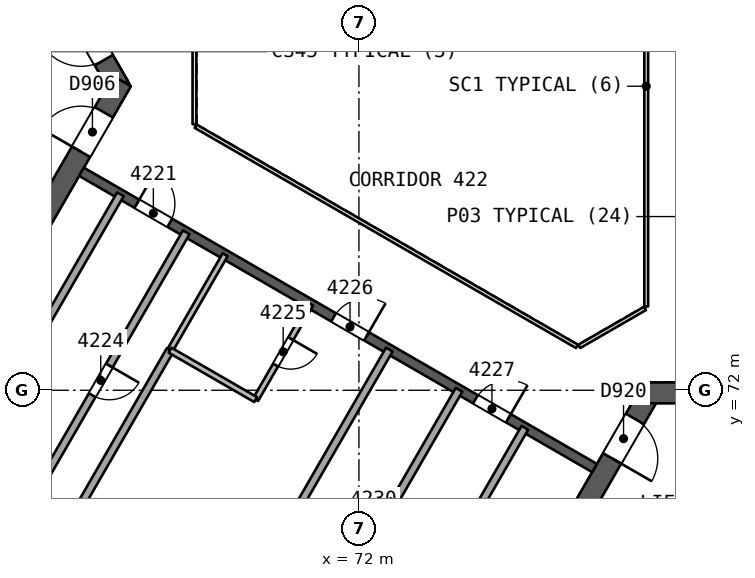
"""IFC4 building model, lengths in metres.
Left out: names, types, materials, properties, quantities, classifications, styles, units other than length and angle.
Written with IfcOpenShell. Run it as: python <this file> out.ifc"""

import sys

from ifc_helpers import new_model, si_unit, direction, frame, frame_2d, origin, place, context, subcontext, project, spatial, rectangle, extrude, element, fill, save


model = new_model("IFC4")
c1 = context("Model", 3, precision=1e-05, world=origin(), true_north=direction((0.0, 1.0)))
c2 = subcontext(c1, "Body", "Model", "MODEL_VIEW")
j1 = project(units=[si_unit("LENGTHUNIT", "METRE"), si_unit("PLANEANGLEUNIT", "RADIAN")], contexts=[c1])
p1 = place(None, origin())
s1 = spatial("IfcSite", under=j1, at=p1, CompositionType="ELEMENT")
p2 = place(p1, origin())
s2 = spatial("IfcBuilding", under=s1, at=p2, CompositionType="ELEMENT")
p3 = place(p2, frame((0.0, 0.0, 174.8)))
s3 = spatial("IfcBuildingStorey", under=s2, at=p3, CompositionType="ELEMENT", Elevation=174.8)
p4 = place(p3, frame((65.682, 80.0, 0.0), z_axis=(0.0, 0.0, 1.0), x_axis=(-0.500000202252, 0.866025287014, 0.0)))
e1 = element("IfcWall", 1, at=p4, inside=s3, PredefinedType="SHEAR", context=c2, shape_type="SweptSolid", body=[
    extrude(rectangle(XDim=10.221, YDim=0.55, at=frame_2d((5.111, 0.0))), origin(), (0.0, 0.0, 1.0), 3.7),
])
p5 = place(p4, frame((0.791, 0.0, 0.0)))
e2 = element("IfcOpeningElement", 2, at=p5, cuts=e1, PredefinedType="OPENING", context=c2, shape_type="SweptSolid", body=[
    extrude(rectangle(XDim=1.2, YDim=2.1, at=frame_2d((0.6, 1.05))), frame((0.0, 0.286, 0.0), z_axis=(0.0, -1.0, 0.0), x_axis=(1.0, 0.0, 0.0)), (0.0, 0.0, 1.0), 0.571),
])
p6 = place(p3, frame((60.709, 71.386, 0.0), z_axis=(0.0, 0.0, 1.0), x_axis=(0.500015938302, 0.866016201606, 0.0)))
e3 = element("IfcWall", 3, at=p6, inside=s3, PredefinedType="SHEAR", context=c2, shape_type="SweptSolid", body=[
    extrude(rectangle(XDim=10.105, YDim=0.55, at=frame_2d((5.053, 0.0))), origin(), (0.0, 0.0, 1.0), 3.7),
])
p7 = place(p6, frame((7.955, 0.0, 0.0)))
e4 = element("IfcOpeningElement", 4, at=p7, cuts=e3, PredefinedType="OPENING", context=c2, shape_type="SweptSolid", body=[
    extrude(rectangle(XDim=1.2, YDim=2.1, at=frame_2d((0.6, 1.05))), frame((0.0, 0.286, 0.0), z_axis=(0.0, -1.0, 0.0), x_axis=(1.0, 0.0, 0.0)), (0.0, 0.0, 1.0), 0.571),
])
p8 = place(p3, frame((79.659, 71.931, 0.0), z_axis=(0.0, 0.0, 1.0), x_axis=(-0.500000202252, -0.866025287014, 0.0)))
e5 = element("IfcWall", 5, at=p8, inside=s3, PredefinedType="SHEAR", context=c2, shape_type="SweptSolid", body=[
    extrude(rectangle(XDim=10.221, YDim=0.55, at=frame_2d((5.111, 0.0))), origin(), (0.0, 0.0, 1.0), 3.7),
])
p9 = place(p8, frame((0.791, 0.0, 0.0)))
e6 = element("IfcOpeningElement", 6, at=p9, cuts=e5, PredefinedType="OPENING", context=c2, shape_type="SweptSolid", body=[
    extrude(rectangle(XDim=1.2, YDim=2.1, at=frame_2d((0.6, 1.05))), frame((0.0, 0.286, 0.0), z_axis=(0.0, -1.0, 0.0), x_axis=(1.0, 0.0, 0.0)), (0.0, 0.0, 1.0), 0.571),
])
p10 = place(p3, frame((89.605, 71.931, 0.0), z_axis=(0.0, 0.0, 1.0), x_axis=(-1.0, 0.0, 0.0)))
e7 = element("IfcWall", 7, at=p10, inside=s3, PredefinedType="SHEAR", context=c2, shape_type="SweptSolid", body=[
    extrude(rectangle(XDim=10.105, YDim=0.55, at=frame_2d((5.052, 0.0))), origin(), (0.0, 0.0, 1.0), 3.7),
])
p11 = place(p10, frame((7.955, 0.0, 0.0)))
e8 = element("IfcOpeningElement", 8, at=p11, cuts=e7, PredefinedType="OPENING", context=c2, shape_type="SweptSolid", body=[
    extrude(rectangle(XDim=1.2, YDim=2.1, at=frame_2d((0.6, 1.05))), frame((0.0, 0.286, 0.0), z_axis=(0.0, -1.0, 0.0), x_axis=(1.0, 0.0, 0.0)), (0.0, 0.0, 1.0), 0.571),
])
p12 = place(p3, frame((64.7, 77.748, 0.0), z_axis=(0.0, 0.0, 1.0), x_axis=(0.866026492143, -0.499998114903, 0.0)))
e9 = element("IfcWall", 9, at=p12, inside=s3, PredefinedType="SHEAR", context=c2, shape_type="SweptSolid", body=[
    extrude(rectangle(XDim=15.588, YDim=0.25, at=frame_2d((7.794, 0.0))), origin(), (0.0, 0.0, 1.0), 3.25),
])
p13 = place(p12, frame((1.682, 0.0, 0.0)))
e10 = element("IfcOpeningElement", 10, at=p13, cuts=e9, PredefinedType="OPENING", context=c2, shape_type="SweptSolid", body=[
    extrude(rectangle(XDim=1.0, YDim=2.1, at=frame_2d((0.5, 1.05))), frame((0.0, 0.135, 0.0), z_axis=(0.0, -1.0, 0.0), x_axis=(1.0, 0.0, 0.0)), (0.0, 0.0, 1.0), 0.271),
])
p14 = place(p12, frame((7.659, 0.0, 0.0)))
e11 = element("IfcOpeningElement", 11, at=p14, cuts=e9, PredefinedType="OPENING", context=c2, shape_type="SweptSolid", body=[
    extrude(rectangle(XDim=1.0, YDim=2.1, at=frame_2d((0.5, 1.05))), frame((0.0, 0.135, 0.0), z_axis=(0.0, -1.0, 0.0), x_axis=(1.0, 0.0, 0.0)), (0.0, 0.0, 1.0), 0.271),
])
p15 = place(p12, frame((11.971, 0.0, 0.0)))
e12 = element("IfcOpeningElement", 12, at=p15, cuts=e9, PredefinedType="OPENING", context=c2, shape_type="SweptSolid", body=[
    extrude(rectangle(XDim=1.0, YDim=2.1, at=frame_2d((0.5, 1.05))), frame((0.0, 0.135, 0.0), z_axis=(0.0, -1.0, 0.0), x_axis=(1.0, 0.0, 0.0)), (0.0, 0.0, 1.0), 0.271),
])
p16 = place(p3, frame((67.456, 76.157, 0.0), z_axis=(0.0, 0.0, 1.0), x_axis=(-0.499990139034, -0.866031096941, 0.0)))
e13 = element("IfcWall", 13, at=p16, inside=s3, PredefinedType="PARTITIONING", context=c2, shape_type="SweptSolid", body=[
    extrude(rectangle(XDim=9.0, YDim=0.2, at=frame_2d((4.5, 0.0))), origin(), (0.0, 0.0, 1.0), 3.25),
])
p17 = place(p16, frame((4.05, 0.0, 0.0)))
e14 = element("IfcOpeningElement", 14, at=p17, cuts=e13, PredefinedType="OPENING", context=c2, shape_type="SweptSolid", body=[
    extrude(rectangle(XDim=0.9, YDim=2.1, at=frame_2d((0.45, 1.05))), frame((0.0, 0.11, 0.0), z_axis=(0.0, -1.0, 0.0), x_axis=(1.0, 0.0, 0.0)), (0.0, 0.0, 1.0), 0.221),
])
p18 = place(p3, frame((61.224, 69.363, 0.0), z_axis=(0.0, 0.0, 1.0), x_axis=(0.499990139034, 0.866031096941, 0.0)))
e15 = element("IfcWall", 15, at=p18, inside=s3, PredefinedType="PARTITIONING", context=c2, shape_type="SweptSolid", body=[
    extrude(rectangle(XDim=9.0, YDim=0.2, at=frame_2d((4.5, 0.0))), origin(), (0.0, 0.0, 1.0), 3.25),
])
p19 = place(p3, frame((62.816, 65.756, 0.0), z_axis=(0.0, 0.0, 1.0), x_axis=(0.500002470373, 0.866023977509, 0.0)))
e16 = element("IfcWall", 16, at=p19, inside=s3, PredefinedType="PARTITIONING", context=c2, shape_type="SweptSolid", body=[
    extrude(rectangle(XDim=8.428, YDim=0.2, at=frame_2d((4.214, 0.0))), origin(), (0.0, 0.0, 1.0), 3.25),
])
p20 = place(p3, frame((67.03, 73.054, 0.0), z_axis=(0.0, 0.0, 1.0), x_axis=(0.499987231761, 0.866032775405, 0.0)))
e17 = element("IfcWall", 17, at=p20, inside=s3, PredefinedType="PARTITIONING", context=c2, shape_type="SweptSolid", body=[
    extrude(rectangle(XDim=2.9, YDim=0.15, at=frame_2d((1.45, 0.0))), origin(), (0.0, 0.0, 1.0), 3.25),
])
p21 = place(p3, frame((70.732, 74.266, 0.0), z_axis=(0.0, 0.0, 1.0), x_axis=(-0.499987231761, -0.866032775405, 0.0)))
e18 = element("IfcWall", 18, at=p21, inside=s3, PredefinedType="PARTITIONING", context=c2, shape_type="SweptSolid", body=[
    extrude(rectangle(XDim=2.9, YDim=0.15, at=frame_2d((1.45, 0.0))), origin(), (0.0, 0.0, 1.0), 3.25),
])
p22 = place(p21, frame((1.05, 0.0, 0.0)))
e19 = element("IfcOpeningElement", 19, at=p22, cuts=e18, PredefinedType="OPENING", context=c2, shape_type="SweptSolid", body=[
    extrude(rectangle(XDim=0.8, YDim=2.1, at=frame_2d((0.4, 1.05))), frame((0.0, 0.085, 0.0), z_axis=(0.0, -1.0, 0.0), x_axis=(1.0, 0.0, 0.0)), (0.0, 0.0, 1.0), 0.171),
])
p23 = place(p3, frame((69.282, 71.754, 0.0), z_axis=(0.0, 0.0, 1.0), x_axis=(-0.866021400173, 0.500006934395, 0.0)))
e20 = element("IfcWall", 20, at=p23, inside=s3, PredefinedType="PARTITIONING", context=c2, shape_type="SweptSolid", body=[
    extrude(rectangle(XDim=2.6, YDim=0.15, at=frame_2d((1.3, 0.0))), origin(), (0.0, 0.0, 1.0), 3.25),
])
p24 = place(p3, frame((67.136, 63.262, 0.0), z_axis=(0.0, 0.0, 1.0), x_axis=(0.499998569178, 0.866026229868, 0.0)))
e21 = element("IfcWall", 21, at=p24, inside=s3, PredefinedType="PARTITIONING", context=c2, shape_type="SweptSolid", body=[
    extrude(rectangle(XDim=11.328, YDim=0.2, at=frame_2d((5.664, 0.0))), origin(), (0.0, 0.0, 1.0), 3.25),
])
p25 = place(p3, frame((76.366, 71.013, 0.0), z_axis=(0.0, 0.0, 1.0), x_axis=(-0.5000018851, -0.866024315419, 0.0)))
e22 = element("IfcWall", 22, at=p25, inside=s3, PredefinedType="PARTITIONING", context=c2, shape_type="SweptSolid", body=[
    extrude(rectangle(XDim=9.0, YDim=0.2, at=frame_2d((4.5, 0.0))), origin(), (0.0, 0.0, 1.0), 3.25),
])
p26 = place(p3, frame((70.134, 64.219, 0.0), z_axis=(0.0, 0.0, 1.0), x_axis=(0.5000018851, 0.866024315419, 0.0)))
e23 = element("IfcWall", 23, at=p26, inside=s3, PredefinedType="PARTITIONING", context=c2, shape_type="SweptSolid", body=[
    extrude(rectangle(XDim=9.0, YDim=0.2, at=frame_2d((4.5, 0.0))), origin(), (0.0, 0.0, 1.0), 3.25),
])
p27 = place(p26, frame((4.05, 0.0, 0.0)))
e24 = element("IfcOpeningElement", 24, at=p27, cuts=e23, PredefinedType="OPENING", context=c2, shape_type="SweptSolid", body=[
    extrude(rectangle(XDim=0.9, YDim=2.1, at=frame_2d((0.45, 1.05))), frame((0.0, 0.11, 0.0), z_axis=(0.0, -1.0, 0.0), x_axis=(1.0, 0.0, 0.0)), (0.0, 0.0, 1.0), 0.221),
])
p28 = place(p3, frame((88.844, 50.557, 0.0), z_axis=(0.0, 0.0, 1.0), x_axis=(-0.866025382531, 0.500000036812, 0.0)))
e25 = element("IfcWall", 25, at=p28, inside=s3, PredefinedType="SOLIDWALL", context=c2, shape_type="SweptSolid", body=[
    extrude(rectangle(XDim=53.42, YDim=0.3, at=frame_2d((26.71, 0.0))), origin(), (0.0, 0.0, 1.0), 3.25),
])
p29 = place(p28, frame((31.122, 0.0, 0.0)))
e26 = element("IfcOpeningElement", 26, at=p29, cuts=e25, PredefinedType="OPENING", context=c2, shape_type="SweptSolid", body=[
    extrude(rectangle(XDim=2.4, YDim=2.4, at=frame_2d((1.2, 1.2))), frame((0.0, 0.161, 0.0), z_axis=(0.0, -1.0, 0.0), x_axis=(1.0, 0.0, 0.0)), (0.0, 0.0, 1.0), 0.321),
])
p30 = place(p28, frame((41.52, 0.0, 0.0)))
e27 = element("IfcOpeningElement", 27, at=p30, cuts=e25, PredefinedType="OPENING", context=c2, shape_type="SweptSolid", body=[
    extrude(rectangle(XDim=2.4, YDim=2.4, at=frame_2d((1.2, 1.2))), frame((0.0, 0.161, 0.0), z_axis=(0.0, -1.0, 0.0), x_axis=(1.0, 0.0, 0.0)), (0.0, 0.0, 1.0), 0.321),
])
p31 = place(p28, frame((20.834, 0.0, 0.0)))
e28 = element("IfcOpeningElement", 28, at=p31, cuts=e25, PredefinedType="OPENING", context=c2, shape_type="SweptSolid", body=[
    extrude(rectangle(XDim=2.4, YDim=2.4, at=frame_2d((1.2, 1.2))), frame((0.0, 0.161, 0.0), z_axis=(0.0, -1.0, 0.0), x_axis=(1.0, 0.0, 0.0)), (0.0, 0.0, 1.0), 0.321),
])
p32 = place(p28, frame((9.507, 0.0, 0.0)))
e29 = element("IfcOpeningElement", 29, at=p32, cuts=e25, PredefinedType="OPENING", context=c2, shape_type="SweptSolid", body=[
    extrude(rectangle(XDim=2.4, YDim=2.4, at=frame_2d((1.2, 1.2))), frame((0.0, 0.161, 0.0), z_axis=(0.0, -1.0, 0.0), x_axis=(1.0, 0.0, 0.0)), (0.0, 0.0, 1.0), 0.321),
])
p33 = place(p28, frame((26.446, 0.0, 0.0)))
e30 = element("IfcOpeningElement", 30, at=p33, cuts=e25, PredefinedType="OPENING", context=c2, shape_type="SweptSolid", body=[
    extrude(rectangle(XDim=2.4, YDim=2.4, at=frame_2d((1.2, 1.2))), frame((0.0, 0.161, 0.0), z_axis=(0.0, -1.0, 0.0), x_axis=(1.0, 0.0, 0.0)), (0.0, 0.0, 1.0), 0.321),
])
p34 = place(p3, frame((77.135, 64.952, 0.0), z_axis=(0.0, 0.0, 1.0), x_axis=(0.866031916153, 0.499988720078, 0.0)))
e31 = element("IfcWall", 31, at=p34, inside=s3, PredefinedType="SOLIDWALL", context=c2, shape_type="SweptSolid", body=[
    extrude(rectangle(XDim=11.35, YDim=0.2, at=frame_2d((5.675, 0.0))), origin(), (0.0, 0.0, 1.0), 3.25),
])
p35 = place(p3, frame((79.56, 74.206, 0.0), z_axis=(0.0, 0.0, 1.0), x_axis=(0.0, 1.0, 0.0)))
e32 = element("IfcWall", 32, at=p35, inside=s3, PredefinedType="PARTITIONING", context=c2, shape_type="SweptSolid", body=[
    extrude(rectangle(XDim=11.588, YDim=0.1, at=frame_2d((5.794, 0.0))), origin(), (0.0, 0.0, 1.0), 3.25),
])
p36 = place(p3, frame((67.672, 81.0, 0.0), z_axis=(0.0, 0.0, 1.0), x_axis=(0.0, -1.0, 0.0)))
e33 = element("IfcWall", 33, at=p36, inside=s3, PredefinedType="PARTITIONING", context=c2, shape_type="SweptSolid", body=[
    extrude(rectangle(XDim=2.0, YDim=0.1, at=frame_2d((1.0, 0.0))), origin(), (0.0, 0.0, 1.0), 3.25),
])
p37 = place(p3, frame((67.702, 78.948, 0.0), z_axis=(0.0, 0.0, 1.0), x_axis=(0.866026658274, -0.499997827154, 0.0)))
e34 = element("IfcWall", 34, at=p37, inside=s3, PredefinedType="PARTITIONING", context=c2, shape_type="SweptSolid", body=[
    extrude(rectangle(XDim=11.588, YDim=0.1, at=frame_2d((5.794, 0.0))), origin(), (0.0, 0.0, 1.0), 3.25),
])
p38 = place(p3, frame((77.798, 73.154, 0.0), z_axis=(0.0, 0.0, 1.0), x_axis=(0.866041268327, 0.499972520799, 0.0)))
e35 = element("IfcWall", 35, at=p38, inside=s3, PredefinedType="PARTITIONING", context=c2, shape_type="SweptSolid", body=[
    extrude(rectangle(XDim=2.0, YDim=0.1, at=frame_2d((1.0, 0.0))), origin(), (0.0, 0.0, 1.0), 3.25),
])
p39 = place(p13, origin())
e36 = element("IfcDoor", 36, at=p39, inside=s3, OperationType="SINGLE_SWING_LEFT", PredefinedType="NOTDEFINED", context=c2, shape_type="SweptSolid", body=[
    extrude(rectangle(XDim=1.0, YDim=2.1, at=frame_2d((0.5, 1.05))), frame((0.0, 0.025, 0.0), z_axis=(0.0, -1.0, 0.0), x_axis=(1.0, 0.0, 0.0)), (0.0, 0.0, 1.0), 0.05),
])
fill(e10, e36)
p40 = place(p17, origin())
e37 = element("IfcDoor", 37, at=p40, inside=s3, OperationType="SINGLE_SWING_LEFT", PredefinedType="NOTDEFINED", context=c2, shape_type="SweptSolid", body=[
    extrude(rectangle(XDim=0.9, YDim=2.1, at=frame_2d((0.45, 1.05))), frame((0.0, 0.025, 0.0), z_axis=(0.0, -1.0, 0.0), x_axis=(1.0, 0.0, 0.0)), (0.0, 0.0, 1.0), 0.05),
])
fill(e14, e37)
p41 = place(p22, origin())
e38 = element("IfcDoor", 38, at=p41, inside=s3, OperationType="SINGLE_SWING_LEFT", PredefinedType="NOTDEFINED", context=c2, shape_type="SweptSolid", body=[
    extrude(rectangle(XDim=0.8, YDim=2.1, at=frame_2d((0.4, 1.05))), frame((0.0, 0.025, 0.0), z_axis=(0.0, -1.0, 0.0), x_axis=(1.0, 0.0, 0.0)), (0.0, 0.0, 1.0), 0.05),
])
fill(e19, e38)
p42 = place(p14, origin())
e39 = element("IfcDoor", 39, at=p42, inside=s3, OperationType="SINGLE_SWING_RIGHT", PredefinedType="NOTDEFINED", context=c2, shape_type="SweptSolid", body=[
    extrude(rectangle(XDim=1.0, YDim=2.1, at=frame_2d((0.5, 1.05))), frame((0.0, 0.025, 0.0), z_axis=(0.0, -1.0, 0.0), x_axis=(1.0, 0.0, 0.0)), (0.0, 0.0, 1.0), 0.05),
])
fill(e11, e39)
p43 = place(p15, origin())
e40 = element("IfcDoor", 40, at=p43, inside=s3, OperationType="SINGLE_SWING_RIGHT", PredefinedType="NOTDEFINED", context=c2, shape_type="SweptSolid", body=[
    extrude(rectangle(XDim=1.0, YDim=2.1, at=frame_2d((0.5, 1.05))), frame((0.0, 0.025, 0.0), z_axis=(0.0, -1.0, 0.0), x_axis=(1.0, 0.0, 0.0)), (0.0, 0.0, 1.0), 0.05),
])
fill(e12, e40)
p44 = place(p5, origin())
e41 = element("IfcDoor", 41, at=p44, inside=s3, OperationType="SINGLE_SWING_RIGHT", PredefinedType="NOTDEFINED", context=c2, shape_type="SweptSolid", body=[
    extrude(rectangle(XDim=1.2, YDim=2.1, at=frame_2d((0.6, 1.05))), frame((0.0, 0.025, 0.0), z_axis=(0.0, -1.0, 0.0), x_axis=(1.0, 0.0, 0.0)), (0.0, 0.0, 1.0), 0.05),
])
fill(e2, e41)
p45 = place(p7, origin())
e42 = element("IfcDoor", 42, at=p45, inside=s3, OperationType="SINGLE_SWING_LEFT", PredefinedType="NOTDEFINED", context=c2, shape_type="SweptSolid", body=[
    extrude(rectangle(XDim=1.2, YDim=2.1, at=frame_2d((0.6, 1.05))), frame((0.0, 0.025, 0.0), z_axis=(0.0, -1.0, 0.0), x_axis=(1.0, 0.0, 0.0)), (0.0, 0.0, 1.0), 0.05),
])
fill(e4, e42)
p46 = place(p9, origin())
e43 = element("IfcDoor", 43, at=p46, inside=s3, OperationType="SINGLE_SWING_RIGHT", PredefinedType="NOTDEFINED", context=c2, shape_type="SweptSolid", body=[
    extrude(rectangle(XDim=1.2, YDim=2.1, at=frame_2d((0.6, 1.05))), frame((0.0, 0.025, 0.0), z_axis=(0.0, -1.0, 0.0), x_axis=(1.0, 0.0, 0.0)), (0.0, 0.0, 1.0), 0.05),
])
fill(e6, e43)
save(model, sys.argv[1])
